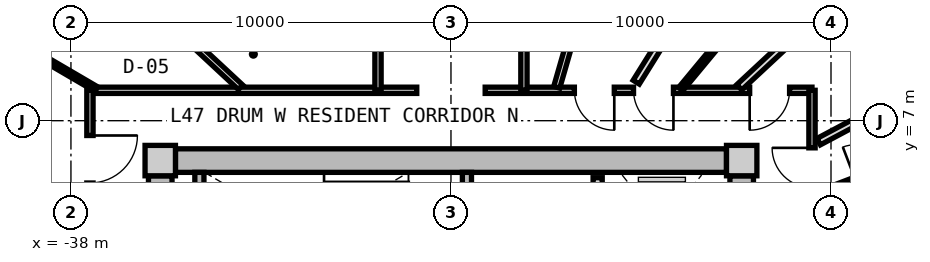
"""IFC4 building model, lengths in metres.
Left out: names, types, materials, properties, quantities, classifications, styles, units other than length and angle.
Written with IfcOpenShell. Run it as: python <this file> out.ifc"""

import sys

from ifc_helpers import new_model, si_unit, direction, frame, frame_2d, origin, origin_2d, place, context, subcontext, project, spatial, rectangle, extrude, source, transform, mapped, element, fill, save


model = new_model("IFC4")
c1 = context("Model", 3, precision=1e-05, world=origin(), true_north=direction((0.0, 1.0)))
c2 = subcontext(c1, "Body", "Model", "MODEL_VIEW")
j1 = project(units=[si_unit("LENGTHUNIT", "METRE"), si_unit("PLANEANGLEUNIT", "RADIAN")], contexts=[c1])
p1 = place(None, origin())
s1 = spatial("IfcSite", under=j1, at=p1, CompositionType="ELEMENT")
p2 = place(p1, origin())
s2 = spatial("IfcBuilding", under=s1, at=p2, CompositionType="ELEMENT")
p3 = place(p2, frame((0.0, 0.0, 152.6)))
s3 = spatial("IfcBuildingStorey", under=s2, at=p3, CompositionType="ELEMENT", Elevation=152.6)
m1 = source(origin(), c2, "Body", "SweptSolid", [
    extrude(rectangle(XDim=0.8, YDim=0.8, at=origin_2d()), origin(), (0.0, 0.0, 1.0), 3.05),
])
for number, where, z_axis, x_axis in (
    (1, (-20.35, 5.95, 0.0), (0.0, 0.0, 1.0), (1.0, 0.0, 0.0)),
    (2, (-35.65, 5.95, 0.0), (0.0, 0.0, 1.0), (1.0, 0.0, 0.0)),
):
    element("IfcColumn", number, at=place(p3, frame(where, z_axis=z_axis, x_axis=x_axis)), inside=s3, PredefinedType="COLUMN", context=c2, shape_type="MappedRepresentation", body=[
        mapped(m1, transform((0.0, 0.0, 0.0), x_axis=(1.0, 0.0, 0.0), y_axis=(0.0, 1.0, 0.0), z_axis=(0.0, 0.0, 1.0), scale=1.0)),
    ])
m2 = source(origin(), c2, "Body", "SweptSolid", [
    extrude(rectangle(XDim=14.5, YDim=0.62, at=frame_2d((7.25, 0.0))), origin(), (0.0, 0.0, 1.0), 2.81),
])
p4 = place(p3, frame((-35.25, 5.95, 0.0), z_axis=(0.0, 0.0, 1.0), x_axis=(1.0, 0.0, 0.0)))
e3 = element("IfcWall", 3, at=p4, inside=s3, PredefinedType="SHEAR", context=c2, shape_type="MappedRepresentation", body=[
    mapped(m2, transform((0.0, 0.0, 0.0), x_axis=(1.0, 0.0, 0.0), y_axis=(0.0, 1.0, 0.0), z_axis=(0.0, 0.0, 1.0), scale=1.0)),
])
m3 = source(origin(), c2, "Body", "SweptSolid", [
    extrude(rectangle(XDim=11.1, YDim=0.62, at=frame_2d((5.55, 0.0))), origin(), (0.0, 0.0, 1.0), 2.81),
])
p5 = place(p3, frame((-35.65, -5.55, 0.0), z_axis=(0.0, 0.0, 1.0), x_axis=(0.0, 1.0, 0.0)))
e4 = element("IfcWall", 4, at=p5, inside=s3, PredefinedType="SHEAR", context=c2, shape_type="MappedRepresentation", body=[
    mapped(m3, transform((0.0, 0.0, 0.0), x_axis=(1.0, 0.0, 0.0), y_axis=(0.0, 1.0, 0.0), z_axis=(0.0, 0.0, 1.0), scale=1.0)),
])
p6 = place(p5, frame((3.8, 0.0, 0.0)))
e5 = element("IfcOpeningElement", 5, at=p6, cuts=e4, PredefinedType="OPENING", context=c2, shape_type="SweptSolid", body=[
    extrude(rectangle(XDim=1.2, YDim=2.15, at=frame_2d((0.6, 1.075))), frame((0.0, 0.32, 0.0), z_axis=(0.0, -1.0, 0.0), x_axis=(1.0, 0.0, 0.0)), (0.0, 0.0, 1.0), 0.64),
])
p7 = place(p3, frame((-20.35, 5.55, 0.0), z_axis=(0.0, 0.0, 1.0), x_axis=(0.0, -1.0, 0.0)))
e6 = element("IfcWall", 6, at=p7, inside=s3, PredefinedType="SHEAR", context=c2, shape_type="MappedRepresentation", body=[
    mapped(m3, transform((0.0, 0.0, 0.0), x_axis=(1.0, 0.0, 0.0), y_axis=(0.0, 1.0, 0.0), z_axis=(0.0, 0.0, 1.0), scale=1.0)),
])
p8 = place(p7, frame((5.65, 0.0, 0.0)))
e7 = element("IfcOpeningElement", 7, at=p8, cuts=e6, PredefinedType="OPENING", context=c2, shape_type="SweptSolid", body=[
    extrude(rectangle(XDim=1.2, YDim=2.15, at=frame_2d((0.6, 1.075))), frame((0.0, 0.32, 0.0), z_axis=(0.0, -1.0, 0.0), x_axis=(1.0, 0.0, 0.0)), (0.0, 0.0, 1.0), 0.64),
])
p9 = place(p7, frame((9.3, 0.0, 0.0)))
e8 = element("IfcOpeningElement", 8, at=p9, cuts=e6, PredefinedType="OPENING", context=c2, shape_type="SweptSolid", body=[
    extrude(rectangle(XDim=1.0, YDim=2.1, at=frame_2d((0.5, 1.05))), frame((0.0, 0.32, 0.0), z_axis=(0.0, -1.0, 0.0), x_axis=(1.0, 0.0, 0.0)), (0.0, 0.0, 1.0), 0.64),
])
m4 = source(origin(), c2, "Body", "SweptSolid", [
    extrude(rectangle(XDim=3.19, YDim=0.24, at=frame_2d((1.595, 0.0))), origin(), (0.0, 0.0, 1.0), 2.81),
])
p10 = place(p3, frame((-34.62, 2.45, 0.0), z_axis=(0.0, 0.0, 1.0), x_axis=(0.0, 1.0, 0.0)))
e9 = element("IfcWall", 9, at=p10, inside=s3, PredefinedType="PARTITIONING", context=c2, shape_type="MappedRepresentation", body=[
    mapped(m4, transform((0.0, 0.0, 0.0), x_axis=(1.0, 0.0, 0.0), y_axis=(0.0, 1.0, 0.0), z_axis=(0.0, 0.0, 1.0), scale=1.0)),
])
p11 = place(p3, frame((-27.58, 2.45, 0.0), z_axis=(0.0, 0.0, 1.0), x_axis=(0.0, 1.0, 0.0)))
e10 = element("IfcWall", 10, at=p11, inside=s3, PredefinedType="PARTITIONING", context=c2, shape_type="MappedRepresentation", body=[
    mapped(m4, transform((0.0, 0.0, 0.0), x_axis=(1.0, 0.0, 0.0), y_axis=(0.0, 1.0, 0.0), z_axis=(0.0, 0.0, 1.0), scale=1.0)),
])
p12 = place(p11, frame((0.55, 0.0, 0.0)))
e11 = element("IfcOpeningElement", 11, at=p12, cuts=e10, PredefinedType="OPENING", context=c2, shape_type="SweptSolid", body=[
    extrude(rectangle(XDim=1.1, YDim=2.15, at=frame_2d((0.55, 1.075))), frame((0.0, 0.13, 0.0), z_axis=(0.0, -1.0, 0.0), x_axis=(1.0, 0.0, 0.0)), (0.0, 0.0, 1.0), 0.26),
])
m5 = source(origin(), c2, "Body", "SweptSolid", [
    extrude(rectangle(XDim=5.0, YDim=0.24, at=frame_2d((2.5, 0.0))), origin(), (0.0, 0.0, 1.0), 2.795),
])
p13 = place(p3, frame((-24.14, 0.5, 0.0), z_axis=(0.0, 0.0, 1.0), x_axis=(0.0, 1.0, 0.0)))
e12 = element("IfcWall", 12, at=p13, inside=s3, PredefinedType="PARTITIONING", context=c2, shape_type="MappedRepresentation", body=[
    mapped(m5, transform((0.0, 0.0, 0.0), x_axis=(1.0, 0.0, 0.0), y_axis=(0.0, 1.0, 0.0), z_axis=(0.0, 0.0, 1.0), scale=1.0)),
])
p14 = place(p13, frame((3.05, 0.0, 0.0)))
e13 = element("IfcOpeningElement", 13, at=p14, cuts=e12, PredefinedType="OPENING", context=c2, shape_type="SweptSolid", body=[
    extrude(rectangle(XDim=1.3, YDim=2.2, at=frame_2d((0.65, 1.1))), frame((0.0, 0.13, 0.0), z_axis=(0.0, -1.0, 0.0), x_axis=(1.0, 0.0, 0.0)), (0.0, 0.0, 1.0), 0.26),
])
p15 = place(p13, frame((0.55, 0.0, 0.0)))
e14 = element("IfcOpeningElement", 14, at=p15, cuts=e12, PredefinedType="OPENING", context=c2, shape_type="SweptSolid", body=[
    extrude(rectangle(XDim=1.3, YDim=2.2, at=frame_2d((0.65, 1.1))), frame((0.0, 0.13, 0.0), z_axis=(0.0, -1.0, 0.0), x_axis=(1.0, 0.0, 0.0)), (0.0, 0.0, 1.0), 0.26),
])
m6 = source(origin(), c2, "Body", "SweptSolid", [
    extrude(rectangle(XDim=8.6, YDim=0.165, at=frame_2d((4.3, 0.0))), origin(), (0.0, 0.0, 1.0), 2.795),
])
p16 = place(p3, frame((-37.5, 7.8, 0.0), z_axis=(0.0, 0.0, 1.0), x_axis=(1.0, 0.0, 0.0)))
e15 = element("IfcWall", 15, at=p16, inside=s3, PredefinedType="PARTITIONING", context=c2, shape_type="MappedRepresentation", body=[
    mapped(m6, transform((0.0, 0.0, 0.0), x_axis=(1.0, 0.0, 0.0), y_axis=(0.0, 1.0, 0.0), z_axis=(0.0, 0.0, 1.0), scale=1.0)),
])
p17 = place(p3, frame((-27.1, 7.8, 0.0), z_axis=(0.0, 0.0, 1.0), x_axis=(1.0, 0.0, 0.0)))
e16 = element("IfcWall", 16, at=p17, inside=s3, PredefinedType="PARTITIONING", context=c2, shape_type="MappedRepresentation", body=[
    mapped(m6, transform((0.0, 0.0, 0.0), x_axis=(1.0, 0.0, 0.0), y_axis=(0.0, 1.0, 0.0), z_axis=(0.0, 0.0, 1.0), scale=1.0)),
])
p18 = place(p17, frame((6.96, 0.0, 0.0)))
e17 = element("IfcOpeningElement", 17, at=p18, cuts=e16, PredefinedType="OPENING", context=c2, shape_type="SweptSolid", body=[
    extrude(rectangle(XDim=1.05, YDim=2.15, at=frame_2d((0.525, 1.075))), frame((0.0, 0.093, 0.0), z_axis=(0.0, -1.0, 0.0), x_axis=(1.0, 0.0, 0.0)), (0.0, 0.0, 1.0), 0.185),
])
p19 = place(p17, frame((3.904, 0.0, 0.0)))
e18 = element("IfcOpeningElement", 18, at=p19, cuts=e16, PredefinedType="OPENING", context=c2, shape_type="SweptSolid", body=[
    extrude(rectangle(XDim=1.05, YDim=2.15, at=frame_2d((0.525, 1.075))), frame((0.0, 0.093, 0.0), z_axis=(0.0, -1.0, 0.0), x_axis=(1.0, 0.0, 0.0)), (0.0, 0.0, 1.0), 0.185),
])
p20 = place(p17, frame((2.347, 0.0, 0.0)))
e19 = element("IfcOpeningElement", 19, at=p20, cuts=e16, PredefinedType="OPENING", context=c2, shape_type="SweptSolid", body=[
    extrude(rectangle(XDim=1.05, YDim=2.15, at=frame_2d((0.525, 1.075))), frame((0.0, 0.093, 0.0), z_axis=(0.0, -1.0, 0.0), x_axis=(1.0, 0.0, 0.0)), (0.0, 0.0, 1.0), 0.185),
])
m7 = source(origin(), c2, "Body", "SweptSolid", [
    extrude(rectangle(XDim=15.6, YDim=0.165, at=frame_2d((7.8, 0.0))), origin(), (0.0, 0.0, 1.0), 2.795),
])
p21 = place(p3, frame((-37.5, -7.8, 0.0), z_axis=(0.0, 0.0, 1.0), x_axis=(0.0, 1.0, 0.0)))
e20 = element("IfcWall", 20, at=p21, inside=s3, PredefinedType="PARTITIONING", context=c2, shape_type="MappedRepresentation", body=[
    mapped(m7, transform((0.0, 0.0, 0.0), x_axis=(1.0, 0.0, 0.0), y_axis=(0.0, 1.0, 0.0), z_axis=(0.0, 0.0, 1.0), scale=1.0)),
])
p22 = place(p21, frame((13.16, 0.0, 0.0)))
e21 = element("IfcOpeningElement", 21, at=p22, cuts=e20, PredefinedType="OPENING", context=c2, shape_type="SweptSolid", body=[
    extrude(rectangle(XDim=1.25, YDim=2.2, at=frame_2d((0.625, 1.1))), frame((0.0, 0.093, 0.0), z_axis=(0.0, -1.0, 0.0), x_axis=(1.0, 0.0, 0.0)), (0.0, 0.0, 1.0), 0.185),
])
p23 = place(p21, frame((7.757, 0.0, 0.0)))
e22 = element("IfcOpeningElement", 22, at=p23, cuts=e20, PredefinedType="OPENING", context=c2, shape_type="SweptSolid", body=[
    extrude(rectangle(XDim=1.25, YDim=2.2, at=frame_2d((0.625, 1.1))), frame((0.0, 0.093, 0.0), z_axis=(0.0, -1.0, 0.0), x_axis=(1.0, 0.0, 0.0)), (0.0, 0.0, 1.0), 0.185),
])
p24 = place(p21, frame((1.62, 0.0, 0.0)))
e23 = element("IfcOpeningElement", 23, at=p24, cuts=e20, PredefinedType="OPENING", context=c2, shape_type="SweptSolid", body=[
    extrude(rectangle(XDim=1.25, YDim=2.2, at=frame_2d((0.625, 1.1))), frame((0.0, 0.093, 0.0), z_axis=(0.0, -1.0, 0.0), x_axis=(1.0, 0.0, 0.0)), (0.0, 0.0, 1.0), 0.185),
])
p25 = place(p3, frame((-18.5, 7.8, 0.0), z_axis=(0.0, 0.0, 1.0), x_axis=(0.0, -1.0, 0.0)))
e24 = element("IfcWall", 24, at=p25, inside=s3, PredefinedType="PARTITIONING", context=c2, shape_type="MappedRepresentation", body=[
    mapped(m7, transform((0.0, 0.0, 0.0), x_axis=(1.0, 0.0, 0.0), y_axis=(0.0, 1.0, 0.0), z_axis=(0.0, 0.0, 1.0), scale=1.0)),
])
p26 = place(p25, frame((8.314, 0.0, 0.0)))
e25 = element("IfcOpeningElement", 25, at=p26, cuts=e24, PredefinedType="OPENING", context=c2, shape_type="SweptSolid", body=[
    extrude(rectangle(XDim=1.25, YDim=2.2, at=frame_2d((0.625, 1.1))), frame((0.0, 0.093, 0.0), z_axis=(0.0, -1.0, 0.0), x_axis=(1.0, 0.0, 0.0)), (0.0, 0.0, 1.0), 0.185),
])
p27 = place(p25, frame((1.515, 0.0, 0.0)))
e26 = element("IfcOpeningElement", 26, at=p27, cuts=e24, PredefinedType="OPENING", context=c2, shape_type="SweptSolid", body=[
    extrude(rectangle(XDim=1.05, YDim=2.15, at=frame_2d((0.525, 1.075))), frame((0.0, 0.093, 0.0), z_axis=(0.0, -1.0, 0.0), x_axis=(1.0, 0.0, 0.0)), (0.0, 0.0, 1.0), 0.185),
])
m8 = source(origin(), c2, "Body", "SweptSolid", [
    extrude(rectangle(XDim=9.73, YDim=0.165, at=frame_2d((4.865, 0.0))), origin(), (0.0, 0.0, 1.0), 2.345),
])
p28 = place(p3, frame((-25.217, 7.88, 0.0), z_axis=(0.0, 0.0, 1.0), x_axis=(0.27679492614, 0.960929013436, 0.0)))
e27 = element("IfcWall", 27, at=p28, inside=s3, PredefinedType="PARTITIONING", context=c2, shape_type="MappedRepresentation", body=[
    mapped(m8, transform((0.0, 0.0, 0.0), x_axis=(1.0, 0.0, 0.0), y_axis=(0.0, 1.0, 0.0), z_axis=(0.0, 0.0, 1.0), scale=1.0)),
])
m9 = source(origin(), c2, "Body", "SweptSolid", [
    extrude(rectangle(XDim=7.648, YDim=0.165, at=frame_2d((3.824, 0.0))), origin(), (0.0, 0.0, 1.0), 2.345),
])
p29 = place(p3, frame((-33.538, 7.88, 0.0), z_axis=(0.0, 0.0, 1.0), x_axis=(-0.732167856666, 0.681124239522, 0.0)))
e28 = element("IfcWall", 28, at=p29, inside=s3, PredefinedType="PARTITIONING", context=c2, shape_type="MappedRepresentation", body=[
    mapped(m9, transform((0.0, 0.0, 0.0), x_axis=(1.0, 0.0, 0.0), y_axis=(0.0, 1.0, 0.0), z_axis=(0.0, 0.0, 1.0), scale=1.0)),
])
m10 = source(origin(), c2, "Body", "SweptSolid", [
    extrude(rectangle(XDim=7.465, YDim=0.165, at=frame_2d((3.733, 0.0))), origin(), (0.0, 0.0, 1.0), 2.345),
])
p30 = place(p3, frame((-29.92, 7.8, 0.0), z_axis=(0.0, 0.0, 1.0), x_axis=(0.0, 1.0, 0.0)))
e29 = element("IfcWall", 29, at=p30, inside=s3, PredefinedType="PARTITIONING", context=c2, shape_type="MappedRepresentation", body=[
    mapped(m10, transform((0.0, 0.0, 0.0), x_axis=(1.0, 0.0, 0.0), y_axis=(0.0, 1.0, 0.0), z_axis=(0.0, 0.0, 1.0), scale=1.0)),
])
p31 = place(p30, frame((3.208, 0.0, 0.0)))
e30 = element("IfcOpeningElement", 30, at=p31, cuts=e29, PredefinedType="OPENING", context=c2, shape_type="SweptSolid", body=[
    extrude(rectangle(XDim=1.05, YDim=2.15, at=frame_2d((0.525, 1.075))), frame((0.0, 0.093, 0.0), z_axis=(0.0, -1.0, 0.0), x_axis=(1.0, 0.0, 0.0)), (0.0, 0.0, 1.0), 0.185),
])
m11 = source(origin(), c2, "Body", "SweptSolid", [
    extrude(rectangle(XDim=7.465, YDim=0.165, at=frame_2d((3.733, 0.0))), origin(), (0.0, 0.0, 1.0), 2.795),
])
p32 = place(p3, frame((-26.08, 7.8, 0.0), z_axis=(0.0, 0.0, 1.0), x_axis=(0.0, 1.0, 0.0)))
e31 = element("IfcWall", 31, at=p32, inside=s3, PredefinedType="PARTITIONING", context=c2, shape_type="MappedRepresentation", body=[
    mapped(m11, transform((0.0, 0.0, 0.0), x_axis=(1.0, 0.0, 0.0), y_axis=(0.0, 1.0, 0.0), z_axis=(0.0, 0.0, 1.0), scale=1.0)),
])
p33 = place(p32, frame((3.208, 0.0, 0.0)))
e32 = element("IfcOpeningElement", 32, at=p33, cuts=e31, PredefinedType="OPENING", context=c2, shape_type="SweptSolid", body=[
    extrude(rectangle(XDim=1.05, YDim=2.15, at=frame_2d((0.525, 1.075))), frame((0.0, 0.093, 0.0), z_axis=(0.0, -1.0, 0.0), x_axis=(1.0, 0.0, 0.0)), (0.0, 0.0, 1.0), 0.185),
])
m12 = source(origin(), c2, "Body", "SweptSolid", [
    extrude(rectangle(XDim=6.193, YDim=0.19, at=frame_2d((3.096, 0.0))), origin(), (0.0, 0.0, 1.0), 2.345),
])
p34 = place(p3, frame((-37.58, 4.419, 0.0), z_axis=(0.0, 0.0, 1.0), x_axis=(-0.970309243466, 0.241867674657, 0.0)))
e33 = element("IfcWall", 33, at=p34, inside=s3, PredefinedType="PARTITIONING", context=c2, shape_type="MappedRepresentation", body=[
    mapped(m12, transform((0.0, 0.0, 0.0), x_axis=(1.0, 0.0, 0.0), y_axis=(0.0, 1.0, 0.0), z_axis=(0.0, 0.0, 1.0), scale=1.0)),
])
m13 = source(origin(), c2, "Body", "SweptSolid", [
    extrude(rectangle(XDim=2.323, YDim=0.14, at=frame_2d((1.161, 0.0))), origin(), (0.0, 0.0, 1.0), 2.795),
])
p35 = place(p3, frame((-37.331, 7.83, 0.0), z_axis=(0.0, 0.0, 1.0), x_axis=(-0.863343994595, 0.504615841009, 0.0)))
e34 = element("IfcWall", 34, at=p35, inside=s3, PredefinedType="PARTITIONING", context=c2, shape_type="MappedRepresentation", body=[
    mapped(m13, transform((0.0, 0.0, 0.0), x_axis=(1.0, 0.0, 0.0), y_axis=(0.0, 1.0, 0.0), z_axis=(0.0, 0.0, 1.0), scale=1.0)),
])
m14 = source(origin(), c2, "Body", "SweptSolid", [
    extrude(rectangle(XDim=8.305, YDim=0.19, at=frame_2d((4.153, 0.0))), origin(), (0.0, 0.0, 1.0), 2.345),
])
p36 = place(p3, frame((-18.42, 3.908, 0.0), z_axis=(0.0, 0.0, 1.0), x_axis=(0.970309994378, 0.241864662175, 0.0)))
e35 = element("IfcWall", 35, at=p36, inside=s3, PredefinedType="PARTITIONING", context=c2, shape_type="MappedRepresentation", body=[
    mapped(m14, transform((0.0, 0.0, 0.0), x_axis=(1.0, 0.0, 0.0), y_axis=(0.0, 1.0, 0.0), z_axis=(0.0, 0.0, 1.0), scale=1.0)),
])
m15 = source(origin(), c2, "Body", "SweptSolid", [
    extrude(rectangle(XDim=7.648, YDim=0.19, at=frame_2d((3.824, 0.0))), origin(), (0.0, 0.0, 1.0), 2.345),
])
p37 = place(p3, frame((-20.413, 7.88, 0.0), z_axis=(0.0, 0.0, 1.0), x_axis=(0.732182665826, 0.681108320213, 0.0)))
e36 = element("IfcWall", 36, at=p37, inside=s3, PredefinedType="PARTITIONING", context=c2, shape_type="MappedRepresentation", body=[
    mapped(m15, transform((0.0, 0.0, 0.0), x_axis=(1.0, 0.0, 0.0), y_axis=(0.0, 1.0, 0.0), z_axis=(0.0, 0.0, 1.0), scale=1.0)),
])
m16 = source(origin(), c2, "Body", "SweptSolid", [
    extrude(rectangle(XDim=6.499, YDim=0.19, at=frame_2d((3.25, 0.0))), origin(), (0.0, 0.0, 1.0), 2.795),
])
p38 = place(p3, frame((-18.324, 6.449, 0.0), z_axis=(0.0, 0.0, 1.0), x_axis=(0.882715595921, 0.469907625729, 0.0)))
e37 = element("IfcWall", 37, at=p38, inside=s3, PredefinedType="PARTITIONING", context=c2, shape_type="MappedRepresentation", body=[
    mapped(m16, transform((0.0, 0.0, 0.0), x_axis=(1.0, 0.0, 0.0), y_axis=(0.0, 1.0, 0.0), z_axis=(0.0, 0.0, 1.0), scale=1.0)),
])
m17 = source(origin(), c2, "Body", "SweptSolid", [
    extrude(rectangle(XDim=3.295, YDim=0.14, at=frame_2d((1.647, 0.0))), origin(), (0.0, 0.0, 1.0), 2.795),
])
p39 = place(p3, frame((-18.47, 5.023, 0.0), z_axis=(0.0, 0.0, 1.0), x_axis=(0.934202224769, 0.356743890258, 0.0)))
e38 = element("IfcWall", 38, at=p39, inside=s3, PredefinedType="PARTITIONING", context=c2, shape_type="MappedRepresentation", body=[
    mapped(m17, transform((0.0, 0.0, 0.0), x_axis=(1.0, 0.0, 0.0), y_axis=(0.0, 1.0, 0.0), z_axis=(0.0, 0.0, 1.0), scale=1.0)),
])
p40 = place(p39, frame((1.188, 0.0, 0.0)))
e39 = element("IfcOpeningElement", 39, at=p40, cuts=e38, PredefinedType="OPENING", context=c2, shape_type="SweptSolid", body=[
    extrude(rectangle(XDim=0.92, YDim=2.1, at=frame_2d((0.46, 1.05))), frame((0.0, 0.08, 0.0), z_axis=(0.0, -1.0, 0.0), x_axis=(1.0, 0.0, 0.0)), (0.0, 0.0, 1.0), 0.16),
])
m18 = source(origin(), c2, "Body", "SweptSolid", [
    extrude(rectangle(XDim=8.422, YDim=0.19, at=frame_2d((4.211, 0.0))), origin(), (0.0, 0.0, 1.0), 2.795),
])
p41 = place(p3, frame((-23.125, 8.014, 0.0), z_axis=(0.0, 0.0, 1.0), x_axis=(0.52925352896, 0.848463730565, 0.0)))
e40 = element("IfcWall", 40, at=p41, inside=s3, PredefinedType="PARTITIONING", context=c2, shape_type="MappedRepresentation", body=[
    mapped(m18, transform((0.0, 0.0, 0.0), x_axis=(1.0, 0.0, 0.0), y_axis=(0.0, 1.0, 0.0), z_axis=(0.0, 0.0, 1.0), scale=1.0)),
])
m19 = source(origin(), c2, "Body", "SweptSolid", [
    extrude(rectangle(XDim=3.593, YDim=0.14, at=frame_2d((1.797, 0.0))), origin(), (0.0, 0.0, 1.0), 2.795),
])
p42 = place(p3, frame((-21.955, 7.83, 0.0), z_axis=(0.0, 0.0, 1.0), x_axis=(0.638271060163, 0.769811700196, 0.0)))
e41 = element("IfcWall", 41, at=p42, inside=s3, PredefinedType="PARTITIONING", context=c2, shape_type="MappedRepresentation", body=[
    mapped(m19, transform((0.0, 0.0, 0.0), x_axis=(1.0, 0.0, 0.0), y_axis=(0.0, 1.0, 0.0), z_axis=(0.0, 0.0, 1.0), scale=1.0)),
])
p43 = place(p42, frame((1.337, 0.0, 0.0)))
e42 = element("IfcOpeningElement", 42, at=p43, cuts=e41, PredefinedType="OPENING", context=c2, shape_type="SweptSolid", body=[
    extrude(rectangle(XDim=0.92, YDim=2.1, at=frame_2d((0.46, 1.05))), frame((0.0, 0.08, 0.0), z_axis=(0.0, -1.0, 0.0), x_axis=(1.0, 0.0, 0.0)), (0.0, 0.0, 1.0), 0.16),
])
m20 = source(origin(), c2, "Body", "SweptSolid", [
    extrude(rectangle(XDim=1.25, YDim=2.2, at=frame_2d((0.625, 1.1))), frame((0.0, 0.025, 0.0), z_axis=(0.0, -1.0, 0.0), x_axis=(1.0, 0.0, 0.0)), (0.0, 0.0, 1.0), 0.05),
])
p44 = place(p22, frame((1.25, 0.0, 0.0), z_axis=(0.0, 0.0, 1.0), x_axis=(-1.0, 0.0, 0.0)))
e43 = element("IfcDoor", 43, at=p44, inside=s3, OperationType="SINGLE_SWING_LEFT", PredefinedType="DOOR", context=c2, shape_type="MappedRepresentation", body=[
    mapped(m20, transform((0.0, 0.0, 0.0), x_axis=(1.0, 0.0, 0.0), y_axis=(0.0, 1.0, 0.0), z_axis=(0.0, 0.0, 1.0), scale=1.0)),
])
fill(e21, e43)
m21 = source(origin(), c2, "Body", "SweptSolid", [
    extrude(rectangle(XDim=1.05, YDim=2.15, at=frame_2d((0.525, 1.075))), frame((0.0, 0.025, 0.0), z_axis=(0.0, -1.0, 0.0), x_axis=(1.0, 0.0, 0.0)), (0.0, 0.0, 1.0), 0.05),
])
p45 = place(p27, frame((1.05, 0.0, 0.0), z_axis=(0.0, 0.0, 1.0), x_axis=(-1.0, 0.0, 0.0)))
e44 = element("IfcDoor", 44, at=p45, inside=s3, OperationType="SINGLE_SWING_RIGHT", PredefinedType="DOOR", context=c2, shape_type="MappedRepresentation", body=[
    mapped(m21, transform((0.0, 0.0, 0.0), x_axis=(1.0, 0.0, 0.0), y_axis=(0.0, 1.0, 0.0), z_axis=(0.0, 0.0, 1.0), scale=1.0)),
])
fill(e26, e44)
p46 = place(p18, frame((1.05, 0.0, 0.0), z_axis=(0.0, 0.0, 1.0), x_axis=(-1.0, 0.0, 0.0)))
e45 = element("IfcDoor", 45, at=p46, inside=s3, OperationType="SINGLE_SWING_RIGHT", PredefinedType="DOOR", context=c2, shape_type="MappedRepresentation", body=[
    mapped(m21, transform((0.0, 0.0, 0.0), x_axis=(1.0, 0.0, 0.0), y_axis=(0.0, 1.0, 0.0), z_axis=(0.0, 0.0, 1.0), scale=1.0)),
])
fill(e17, e45)
p47 = place(p19, frame((1.05, 0.0, 0.0), z_axis=(0.0, 0.0, 1.0), x_axis=(-1.0, 0.0, 0.0)))
e46 = element("IfcDoor", 46, at=p47, inside=s3, OperationType="SINGLE_SWING_LEFT", PredefinedType="DOOR", context=c2, shape_type="MappedRepresentation", body=[
    mapped(m21, transform((0.0, 0.0, 0.0), x_axis=(1.0, 0.0, 0.0), y_axis=(0.0, 1.0, 0.0), z_axis=(0.0, 0.0, 1.0), scale=1.0)),
])
fill(e18, e46)
p48 = place(p20, frame((1.05, 0.0, 0.0), z_axis=(0.0, 0.0, 1.0), x_axis=(-1.0, 0.0, 0.0)))
e47 = element("IfcDoor", 47, at=p48, inside=s3, OperationType="SINGLE_SWING_LEFT", PredefinedType="DOOR", context=c2, shape_type="MappedRepresentation", body=[
    mapped(m21, transform((0.0, 0.0, 0.0), x_axis=(1.0, 0.0, 0.0), y_axis=(0.0, 1.0, 0.0), z_axis=(0.0, 0.0, 1.0), scale=1.0)),
])
fill(e19, e47)
save(model, sys.argv[1])
